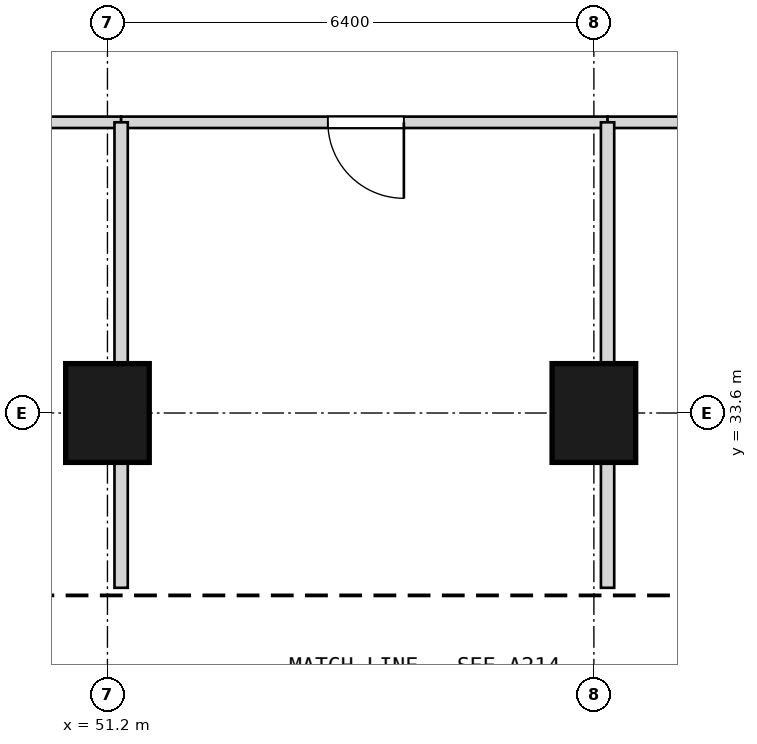
"""IFC4 building model, lengths in metres.
Left out: names, types, materials, properties, quantities, classifications, styles, units other than length and angle.
Written with IfcOpenShell. Run it as: python <this file> out.ifc"""

import sys

from ifc_helpers import new_model, si_unit, direction, frame, frame_2d, origin, origin_2d, place, context, subcontext, project, spatial, rectangle, extrude, element, fill, save


model = new_model("IFC4")
c1 = context("Model", 3, precision=1e-05, world=origin(), true_north=direction((0.0, 1.0)))
c2 = subcontext(c1, "Body", "Model", "MODEL_VIEW")
j1 = project(units=[si_unit("LENGTHUNIT", "METRE"), si_unit("PLANEANGLEUNIT", "RADIAN")], contexts=[c1])
p1 = place(None, origin())
s1 = spatial("IfcSite", under=j1, at=p1, CompositionType="ELEMENT")
p2 = place(p1, origin())
s2 = spatial("IfcBuilding", under=s1, at=p2, CompositionType="ELEMENT")
p3 = place(p2, frame((0.0, 0.0, 8.4)))
s3 = spatial("IfcBuildingStorey", under=s2, at=p3, CompositionType="ELEMENT", Elevation=8.4)
for number, where, z_axis, x_axis in (
    (1, (51.2, 33.6, 0.0), (0.0, 0.0, 1.0), (1.0, 0.0, 0.0)),
    (2, (57.6, 33.6, 0.0), (0.0, 0.0, 1.0), (1.0, 0.0, 0.0)),
):
    element("IfcColumn", number, at=place(p3, frame(where, z_axis=z_axis, x_axis=x_axis)), inside=s3, PredefinedType="COLUMN", context=c2, shape_type="SweptSolid", body=[
        extrude(rectangle(XDim=1.1, YDim=1.3, at=origin_2d()), origin(), (0.0, 0.0, 1.0), 4.5),
    ])
p4 = place(p3, frame((44.62, 37.425, 0.0), z_axis=(0.0, 0.0, 1.0), x_axis=(1.0, 0.0, 0.0)))
e3 = element("IfcWall", 3, at=p4, inside=s3, PredefinedType="PARTITIONING", context=c2, shape_type="SweptSolid", body=[
    extrude(rectangle(XDim=6.76, YDim=0.15, at=frame_2d((3.38, 0.0))), origin(), (0.0, 0.0, 1.0), 4.28),
])
p5 = place(p4, frame((2.88, 0.0, 0.0)))
e4 = element("IfcOpeningElement", 4, at=p5, cuts=e3, PredefinedType="OPENING", context=c2, shape_type="SweptSolid", body=[
    extrude(rectangle(XDim=1.0, YDim=2.1, at=frame_2d((0.5, 1.05))), frame((0.0, 0.085, 0.0), z_axis=(0.0, -1.0, 0.0), x_axis=(1.0, 0.0, 0.0)), (0.0, 0.0, 1.0), 0.17),
])
p6 = place(p3, frame((51.38, 37.425, 0.0), z_axis=(0.0, 0.0, 1.0), x_axis=(1.0, 0.0, 0.0)))
e5 = element("IfcWall", 5, at=p6, inside=s3, PredefinedType="PARTITIONING", context=c2, shape_type="SweptSolid", body=[
    extrude(rectangle(XDim=6.4, YDim=0.15, at=frame_2d((3.2, 0.0))), origin(), (0.0, 0.0, 1.0), 4.28),
])
p7 = place(p6, frame((2.72, 0.0, 0.0)))
e6 = element("IfcOpeningElement", 6, at=p7, cuts=e5, PredefinedType="OPENING", context=c2, shape_type="SweptSolid", body=[
    extrude(rectangle(XDim=1.0, YDim=2.1, at=frame_2d((0.5, 1.05))), frame((0.0, 0.085, 0.0), z_axis=(0.0, -1.0, 0.0), x_axis=(1.0, 0.0, 0.0)), (0.0, 0.0, 1.0), 0.17),
])
p8 = place(p3, frame((57.78, 37.425, 0.0), z_axis=(0.0, 0.0, 1.0), x_axis=(1.0, 0.0, 0.0)))
e7 = element("IfcWall", 7, at=p8, inside=s3, PredefinedType="PARTITIONING", context=c2, shape_type="SweptSolid", body=[
    extrude(rectangle(XDim=5.97, YDim=0.15, at=frame_2d((2.985, 0.0))), origin(), (0.0, 0.0, 1.0), 4.28),
])
p9 = place(p8, frame((2.52, 0.0, 0.0)))
e8 = element("IfcOpeningElement", 8, at=p9, cuts=e7, PredefinedType="OPENING", context=c2, shape_type="SweptSolid", body=[
    extrude(rectangle(XDim=1.0, YDim=2.1, at=frame_2d((0.5, 1.05))), frame((0.0, 0.085, 0.0), z_axis=(0.0, -1.0, 0.0), x_axis=(1.0, 0.0, 0.0)), (0.0, 0.0, 1.0), 0.17),
])
p10 = place(p3, frame((51.38, 31.3, 0.0), z_axis=(0.0, 0.0, 1.0), x_axis=(0.0, 1.0, 0.0)))
e9 = element("IfcWall", 9, at=p10, inside=s3, PredefinedType="PARTITIONING", context=c2, shape_type="SweptSolid", body=[
    extrude(rectangle(XDim=1.67, YDim=0.175, at=frame_2d((0.835, 0.0))), origin(), (0.0, 0.0, 1.0), 3.38),
])
p11 = place(p3, frame((51.38, 34.23, 0.0), z_axis=(0.0, 0.0, 1.0), x_axis=(0.0, 1.0, 0.0)))
e10 = element("IfcWall", 10, at=p11, inside=s3, PredefinedType="PARTITIONING", context=c2, shape_type="SweptSolid", body=[
    extrude(rectangle(XDim=3.195, YDim=0.175, at=frame_2d((1.598, 0.0))), origin(), (0.0, 0.0, 1.0), 3.38),
])
p12 = place(p3, frame((57.78, 31.3, 0.0), z_axis=(0.0, 0.0, 1.0), x_axis=(0.0, 1.0, 0.0)))
e11 = element("IfcWall", 11, at=p12, inside=s3, PredefinedType="PARTITIONING", context=c2, shape_type="SweptSolid", body=[
    extrude(rectangle(XDim=1.67, YDim=0.175, at=frame_2d((0.835, 0.0))), origin(), (0.0, 0.0, 1.0), 3.38),
])
p13 = place(p3, frame((57.78, 34.23, 0.0), z_axis=(0.0, 0.0, 1.0), x_axis=(0.0, 1.0, 0.0)))
e12 = element("IfcWall", 12, at=p13, inside=s3, PredefinedType="PARTITIONING", context=c2, shape_type="SweptSolid", body=[
    extrude(rectangle(XDim=3.195, YDim=0.175, at=frame_2d((1.598, 0.0))), origin(), (0.0, 0.0, 1.0), 3.38),
])
p14 = place(p7, frame((1.0, 0.0, 0.0), z_axis=(0.0, 0.0, 1.0), x_axis=(-1.0, 0.0, 0.0)))
e13 = element("IfcDoor", 13, at=p14, inside=s3, OperationType="SINGLE_SWING_LEFT", PredefinedType="DOOR", context=c2, shape_type="SweptSolid", body=[
    extrude(rectangle(XDim=1.0, YDim=2.1, at=frame_2d((0.5, 1.05))), frame((0.0, 0.025, 0.0), z_axis=(0.0, -1.0, 0.0), x_axis=(1.0, 0.0, 0.0)), (0.0, 0.0, 1.0), 0.05),
])
fill(e6, e13)
save(model, sys.argv[1])
